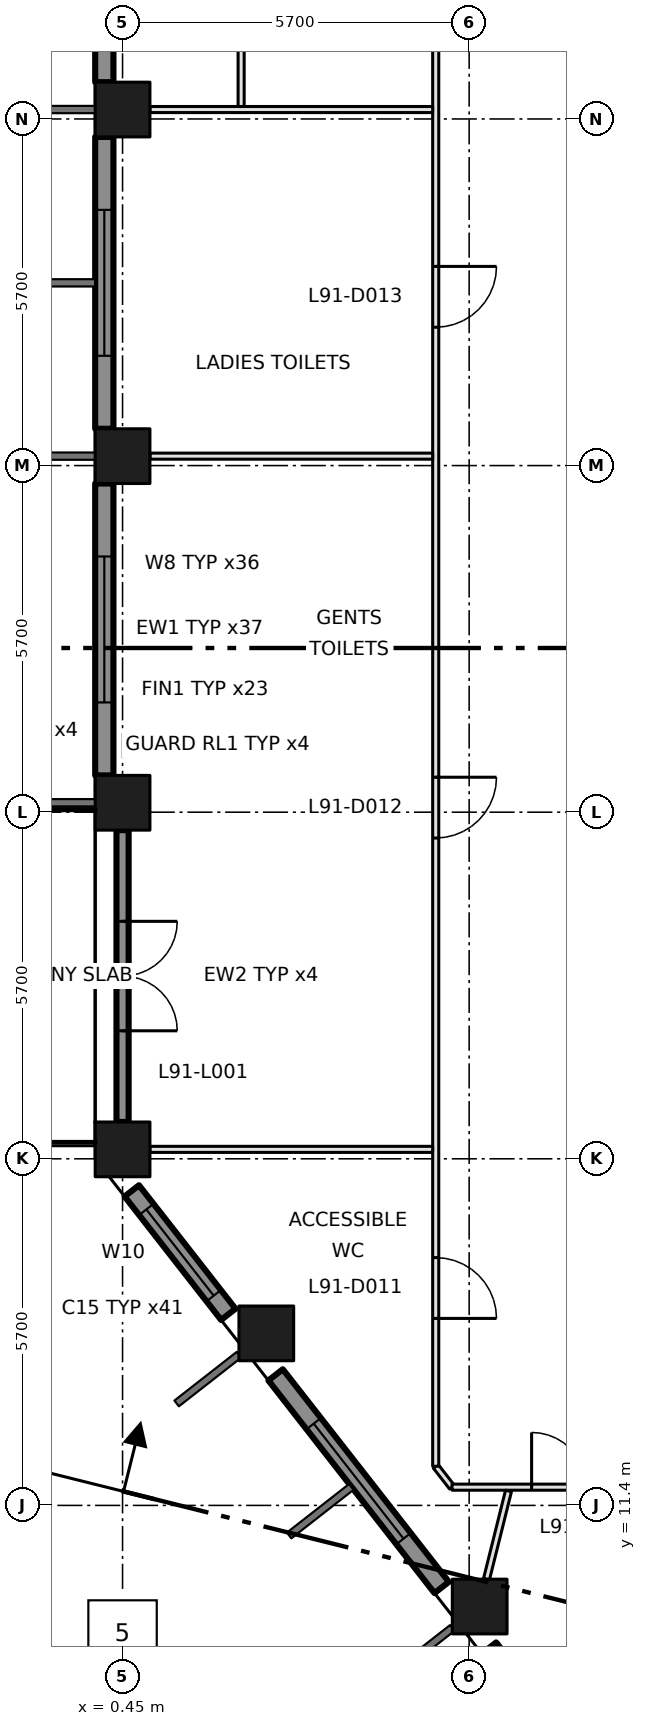
"""IFC4 building model, lengths in metres.
Left out: names, types, materials, properties, quantities, classifications, styles, units other than length and angle.
Written with IfcOpenShell. Run it as: python <this file> out.ifc"""

import sys

from ifc_helpers import new_model, si_unit, direction, frame, frame_2d, origin, origin_2d, place, context, subcontext, project, spatial, rectangle, extrude, element, fill, save


model = new_model("IFC4")
c1 = context("Model", 3, precision=1e-05, world=origin(), true_north=direction((0.0, 1.0)))
c2 = subcontext(c1, "Body", "Model", "MODEL_VIEW")
j1 = project(units=[si_unit("LENGTHUNIT", "METRE"), si_unit("PLANEANGLEUNIT", "RADIAN")], contexts=[c1])
p1 = place(None, origin())
s1 = spatial("IfcSite", under=j1, at=p1, CompositionType="ELEMENT")
p2 = place(p1, origin())
s2 = spatial("IfcBuilding", under=s1, at=p2, CompositionType="ELEMENT")
p3 = place(p2, frame((0.0, 0.0, 396.0)))
s3 = spatial("IfcBuildingStorey", under=s2, at=p3, CompositionType="ELEMENT", Elevation=396.0)
for number, where, z_axis, x_axis in (
    (1, (0.45, 17.255, 0.0), (0.0, 0.0, 1.0), (1.0, 0.0, 0.0)),
    (2, (0.45, 22.955, 0.0), (0.0, 0.0, 1.0), (1.0, 0.0, 0.0)),
    (3, (0.45, 28.655, 0.0), (0.0, 0.0, 1.0), (1.0, 0.0, 0.0)),
    (4, (0.45, 34.355, 0.0), (0.0, 0.0, 1.0), (1.0, 0.0, 0.0)),
    (5, (6.323, 9.737, 0.0), (0.0, 0.0, 1.0), (1.0, 0.0, 0.0)),
    (6, (2.814, 14.229, 0.0), (0.0, 0.0, 1.0), (1.0, 0.0, 0.0)),
):
    element("IfcColumn", number, at=place(p3, frame(where, z_axis=z_axis, x_axis=x_axis)), inside=s3, PredefinedType="COLUMN", context=c2, shape_type="SweptSolid", body=[
        extrude(rectangle(XDim=0.9, YDim=0.9, at=origin_2d()), origin(), (0.0, 0.0, 1.0), 4.2),
    ])
p4 = place(p3, frame((0.15, 39.605, 0.0), z_axis=(0.0, 0.0, 1.0), x_axis=(0.0, -1.0, 0.0)))
e7 = element("IfcWall", 7, at=p4, inside=s3, PredefinedType="SOLIDWALL", context=c2, shape_type="SweptSolid", body=[
    extrude(rectangle(XDim=4.8, YDim=0.3, at=frame_2d((2.4, 0.0))), origin(), (0.0, 0.0, 1.0), 3.05),
])
p5 = place(p4, frame((1.2, 0.0, 0.8)))
e8 = element("IfcOpeningElement", 8, at=p5, cuts=e7, PredefinedType="OPENING", context=c2, shape_type="SweptSolid", body=[
    extrude(rectangle(XDim=2.4, YDim=1.45, at=frame_2d((1.2, 0.725))), frame((0.0, 0.16, 0.0), z_axis=(0.0, -1.0, 0.0), x_axis=(1.0, 0.0, 0.0)), (0.0, 0.0, 1.0), 0.32),
])
p6 = place(p3, frame((0.15, 33.905, 0.0), z_axis=(0.0, 0.0, 1.0), x_axis=(0.0, -1.0, 0.0)))
e9 = element("IfcWall", 9, at=p6, inside=s3, PredefinedType="SOLIDWALL", context=c2, shape_type="SweptSolid", body=[
    extrude(rectangle(XDim=4.8, YDim=0.3, at=frame_2d((2.4, 0.0))), origin(), (0.0, 0.0, 1.0), 3.05),
])
p7 = place(p6, frame((1.2, 0.0, 0.8)))
e10 = element("IfcOpeningElement", 10, at=p7, cuts=e9, PredefinedType="OPENING", context=c2, shape_type="SweptSolid", body=[
    extrude(rectangle(XDim=2.4, YDim=1.45, at=frame_2d((1.2, 0.725))), frame((0.0, 0.16, 0.0), z_axis=(0.0, -1.0, 0.0), x_axis=(1.0, 0.0, 0.0)), (0.0, 0.0, 1.0), 0.32),
])
p8 = place(p3, frame((0.15, 28.205, 0.0), z_axis=(0.0, 0.0, 1.0), x_axis=(0.0, -1.0, 0.0)))
e11 = element("IfcWall", 11, at=p8, inside=s3, PredefinedType="SOLIDWALL", context=c2, shape_type="SweptSolid", body=[
    extrude(rectangle(XDim=4.8, YDim=0.3, at=frame_2d((2.4, 0.0))), origin(), (0.0, 0.0, 1.0), 3.05),
])
p9 = place(p8, frame((1.2, 0.0, 0.8)))
e12 = element("IfcOpeningElement", 12, at=p9, cuts=e11, PredefinedType="OPENING", context=c2, shape_type="SweptSolid", body=[
    extrude(rectangle(XDim=2.4, YDim=1.45, at=frame_2d((1.2, 0.725))), frame((0.0, 0.16, 0.0), z_axis=(0.0, -1.0, 0.0), x_axis=(1.0, 0.0, 0.0)), (0.0, 0.0, 1.0), 0.32),
])
p10 = place(p3, frame((0.45, 22.505, 0.0), z_axis=(0.0, 0.0, 1.0), x_axis=(0.0, -1.0, 0.0)))
e13 = element("IfcWall", 13, at=p10, inside=s3, PredefinedType="SOLIDWALL", context=c2, shape_type="SweptSolid", body=[
    extrude(rectangle(XDim=4.799, YDim=0.2, at=frame_2d((2.399, 0.0))), origin(), (0.0, 0.0, 1.0), 3.05),
])
p11 = place(p10, frame((1.5, 0.0, 0.0)))
e14 = element("IfcOpeningElement", 14, at=p11, cuts=e13, PredefinedType="OPENING", context=c2, shape_type="SweptSolid", body=[
    extrude(rectangle(XDim=1.8, YDim=2.9, at=frame_2d((0.9, 1.45))), frame((0.0, 0.11, 0.0), z_axis=(0.0, -1.0, 0.0), x_axis=(1.0, 0.0, 0.0)), (0.0, 0.0, 1.0), 0.22),
])
p12 = place(p3, frame((0.602, 16.573, 0.0), z_axis=(0.0, 0.0, 1.0), x_axis=(0.61568999437, -0.787988471256, 0.0)))
e15 = element("IfcWall", 15, at=p12, inside=s3, PredefinedType="SOLIDWALL", context=c2, shape_type="SweptSolid", body=[
    extrude(rectangle(XDim=2.577, YDim=0.3, at=frame_2d((1.289, 0.0))), origin(), (0.0, 0.0, 1.0), 3.05),
])
p13 = place(p12, frame((0.388, 0.0, 0.8)))
e16 = element("IfcOpeningElement", 16, at=p13, cuts=e15, PredefinedType="OPENING", context=c2, shape_type="SweptSolid", body=[
    extrude(rectangle(XDim=1.8, YDim=1.45, at=frame_2d((0.9, 0.725))), frame((0.0, 0.16, 0.0), z_axis=(0.0, -1.0, 0.0), x_axis=(1.0, 0.0, 0.0)), (0.0, 0.0, 1.0), 0.32),
])
p14 = place(p3, frame((2.967, 13.547, 0.0), z_axis=(0.0, 0.0, 1.0), x_axis=(0.615486001463, -0.788147817356, 0.0)))
e17 = element("IfcWall", 17, at=p14, inside=s3, PredefinedType="SOLIDWALL", context=c2, shape_type="SweptSolid", body=[
    extrude(rectangle(XDim=4.437, YDim=0.3, at=frame_2d((2.219, 0.0))), origin(), (0.0, 0.0, 1.0), 3.05),
])
p15 = place(p14, frame((1.018, 0.0, 0.8)))
e18 = element("IfcOpeningElement", 18, at=p15, cuts=e17, PredefinedType="OPENING", context=c2, shape_type="SweptSolid", body=[
    extrude(rectangle(XDim=2.4, YDim=1.45, at=frame_2d((1.2, 0.725))), frame((0.0, 0.16, 0.0), z_axis=(0.0, -1.0, 0.0), x_axis=(1.0, 0.0, 0.0)), (0.0, 0.0, 1.0), 0.32),
])
p16 = place(p3, frame((6.476, 9.055, 0.0), z_axis=(0.0, 0.0, 1.0), x_axis=(0.615649380255, -0.788020203162, 0.0)))
e19 = element("IfcWall", 19, at=p16, inside=s3, PredefinedType="SOLIDWALL", context=c2, shape_type="SweptSolid", body=[
    extrude(rectangle(XDim=4.438, YDim=0.3, at=frame_2d((2.219, 0.0))), origin(), (0.0, 0.0, 1.0), 3.05),
])
p17 = place(p16, frame((1.019, 0.0, 0.8)))
e20 = element("IfcOpeningElement", 20, at=p17, cuts=e19, PredefinedType="OPENING", context=c2, shape_type="SweptSolid", body=[
    extrude(rectangle(XDim=2.4, YDim=1.45, at=frame_2d((1.2, 0.725))), frame((0.0, 0.16, 0.0), z_axis=(0.0, -1.0, 0.0), x_axis=(1.0, 0.0, 0.0)), (0.0, 0.0, 1.0), 0.32),
])
p18 = place(p3, frame((5.6, 12.044, 0.0), z_axis=(0.0, 0.0, 1.0), x_axis=(0.614328236968, -0.789050579661, 0.0)))
e21 = element("IfcWall", 21, at=p18, inside=s3, PredefinedType="PARTITIONING", context=c2, shape_type="SweptSolid", body=[
    extrude(rectangle(XDim=0.436, YDim=0.1, at=frame_2d((0.218, 0.0))), origin(), (0.0, 0.0, 1.0), 3.75),
])
p19 = place(p3, frame((5.6, 39.77, 0.0), z_axis=(0.0, 0.0, 1.0), x_axis=(0.0, -1.0, 0.0)))
e22 = element("IfcWall", 22, at=p19, inside=s3, PredefinedType="PARTITIONING", context=c2, shape_type="SweptSolid", body=[
    extrude(rectangle(XDim=27.726, YDim=0.1, at=frame_2d((13.863, 0.0))), origin(), (0.0, 0.0, 1.0), 3.75),
])
p20 = place(p19, frame((24.295, 0.0, 0.0)))
e23 = element("IfcOpeningElement", 23, at=p20, cuts=e22, PredefinedType="OPENING", context=c2, shape_type="SweptSolid", body=[
    extrude(rectangle(XDim=1.0, YDim=2.1, at=frame_2d((0.5, 1.05))), frame((0.0, 0.06, 0.0), z_axis=(0.0, -1.0, 0.0), x_axis=(1.0, 0.0, 0.0)), (0.0, 0.0, 1.0), 0.12),
])
p21 = place(p19, frame((16.395, 0.0, 0.0)))
e24 = element("IfcOpeningElement", 24, at=p21, cuts=e22, PredefinedType="OPENING", context=c2, shape_type="SweptSolid", body=[
    extrude(rectangle(XDim=1.0, YDim=2.1, at=frame_2d((0.5, 1.05))), frame((0.0, 0.06, 0.0), z_axis=(0.0, -1.0, 0.0), x_axis=(1.0, 0.0, 0.0)), (0.0, 0.0, 1.0), 0.12),
])
p22 = place(p19, frame((7.995, 0.0, 0.0)))
e25 = element("IfcOpeningElement", 25, at=p22, cuts=e22, PredefinedType="OPENING", context=c2, shape_type="SweptSolid", body=[
    extrude(rectangle(XDim=1.0, YDim=2.1, at=frame_2d((0.5, 1.05))), frame((0.0, 0.06, 0.0), z_axis=(0.0, -1.0, 0.0), x_axis=(1.0, 0.0, 0.0)), (0.0, 0.0, 1.0), 0.12),
])
p23 = place(p19, frame((2.38, 0.0, 0.0)))
e26 = element("IfcOpeningElement", 26, at=p23, cuts=e22, PredefinedType="OPENING", context=c2, shape_type="SweptSolid", body=[
    extrude(rectangle(XDim=1.0, YDim=2.1, at=frame_2d((0.5, 1.05))), frame((0.0, 0.06, 0.0), z_axis=(0.0, -1.0, 0.0), x_axis=(1.0, 0.0, 0.0)), (0.0, 0.0, 1.0), 0.12),
])
p24 = place(p3, frame((5.868, 11.7, 0.0), z_axis=(0.0, 0.0, 1.0), x_axis=(1.0, 0.0, 0.0)))
e27 = element("IfcWall", 27, at=p24, inside=s3, PredefinedType="PARTITIONING", context=c2, shape_type="SweptSolid", body=[
    extrude(rectangle(XDim=3.433, YDim=0.1, at=frame_2d((1.717, 0.0))), origin(), (0.0, 0.0, 1.0), 3.75),
])
p25 = place(p24, frame((1.309, 0.0, 0.0)))
e28 = element("IfcOpeningElement", 28, at=p25, cuts=e27, PredefinedType="OPENING", context=c2, shape_type="SweptSolid", body=[
    extrude(rectangle(XDim=1.8, YDim=2.1, at=frame_2d((0.9, 1.05))), frame((0.0, 0.06, 0.0), z_axis=(0.0, -1.0, 0.0), x_axis=(1.0, 0.0, 0.0)), (0.0, 0.0, 1.0), 0.12),
])
p26 = place(p3, frame((0.9, 34.355, 0.0), z_axis=(0.0, 0.0, 1.0), x_axis=(1.0, 0.0, 0.0)))
e29 = element("IfcWall", 29, at=p26, inside=s3, PredefinedType="PARTITIONING", context=c2, shape_type="SweptSolid", body=[
    extrude(rectangle(XDim=4.65, YDim=0.1, at=frame_2d((2.325, 0.0))), origin(), (0.0, 0.0, 1.0), 3.75),
])
p27 = place(p3, frame((2.4, 34.405, 0.0), z_axis=(0.0, 0.0, 1.0), x_axis=(0.0, 1.0, 0.0)))
e30 = element("IfcWall", 30, at=p27, inside=s3, PredefinedType="PARTITIONING", context=c2, shape_type="SweptSolid", body=[
    extrude(rectangle(XDim=5.369, YDim=0.1, at=frame_2d((2.685, 0.0))), origin(), (0.0, 0.0, 1.0), 3.75),
])
for number, where, z_axis, x_axis in (
    (31, (5.55, 17.255, 0.0), (0.0, 0.0, 1.0), (-1.0, 0.0, 0.0)),
    (32, (5.55, 28.655, 0.0), (0.0, 0.0, 1.0), (-1.0, 0.0, 0.0)),
):
    element("IfcWall", number, at=place(p3, frame(where, z_axis=z_axis, x_axis=x_axis)), inside=s3, PredefinedType="PARTITIONING", context=c2, shape_type="SweptSolid", body=[
        extrude(rectangle(XDim=4.65, YDim=0.1, at=frame_2d((2.325, 0.0))), origin(), (0.0, 0.0, 1.0), 3.75),
    ])
p28 = place(p3, frame((6.797, 11.638, 0.0), z_axis=(0.0, 0.0, 1.0), x_axis=(-0.242113049408, -0.970248046278, 0.0)))
e33 = element("IfcWall", 33, at=p28, inside=s3, PredefinedType="PARTITIONING", context=c2, shape_type="SweptSolid", body=[
    extrude(rectangle(XDim=1.495, YDim=0.1, at=frame_2d((0.748, 0.0))), origin(), (0.0, 0.0, 1.0), 3.75),
])
p29 = place(p7, origin())
e34 = element("IfcWindow", 34, at=p29, inside=s3, PartitioningType="DOUBLE_PANEL_VERTICAL", PredefinedType="WINDOW", context=c2, shape_type="SweptSolid", body=[
    extrude(rectangle(XDim=2.4, YDim=1.45, at=frame_2d((1.2, 0.725))), frame((0.0, 0.03, 0.0), z_axis=(0.0, -1.0, 0.0), x_axis=(1.0, 0.0, 0.0)), (0.0, 0.0, 1.0), 0.06),
])
fill(e10, e34)
p30 = place(p9, origin())
e35 = element("IfcWindow", 35, at=p30, inside=s3, PartitioningType="DOUBLE_PANEL_VERTICAL", PredefinedType="WINDOW", context=c2, shape_type="SweptSolid", body=[
    extrude(rectangle(XDim=2.4, YDim=1.45, at=frame_2d((1.2, 0.725))), frame((0.0, 0.03, 0.0), z_axis=(0.0, -1.0, 0.0), x_axis=(1.0, 0.0, 0.0)), (0.0, 0.0, 1.0), 0.06),
])
fill(e12, e35)
p31 = place(p11, origin())
e36 = element("IfcDoor", 36, at=p31, inside=s3, OperationType="DOUBLE_DOOR_SINGLE_SWING", PredefinedType="DOOR", context=c2, shape_type="SweptSolid", body=[
    extrude(rectangle(XDim=1.8, YDim=2.9, at=frame_2d((0.9, 1.45))), frame((0.0, 0.025, 0.0), z_axis=(0.0, -1.0, 0.0), x_axis=(1.0, 0.0, 0.0)), (0.0, 0.0, 1.0), 0.05),
])
fill(e14, e36)
p32 = place(p13, origin())
e37 = element("IfcWindow", 37, at=p32, inside=s3, PartitioningType="DOUBLE_PANEL_VERTICAL", PredefinedType="WINDOW", context=c2, shape_type="SweptSolid", body=[
    extrude(rectangle(XDim=1.8, YDim=1.45, at=frame_2d((0.9, 0.725))), frame((0.0, 0.03, 0.0), z_axis=(0.0, -1.0, 0.0), x_axis=(1.0, 0.0, 0.0)), (0.0, 0.0, 1.0), 0.06),
])
fill(e16, e37)
p33 = place(p15, origin())
e38 = element("IfcWindow", 38, at=p33, inside=s3, PartitioningType="DOUBLE_PANEL_VERTICAL", PredefinedType="WINDOW", context=c2, shape_type="SweptSolid", body=[
    extrude(rectangle(XDim=2.4, YDim=1.45, at=frame_2d((1.2, 0.725))), frame((0.0, 0.03, 0.0), z_axis=(0.0, -1.0, 0.0), x_axis=(1.0, 0.0, 0.0)), (0.0, 0.0, 1.0), 0.06),
])
fill(e18, e38)
p34 = place(p25, origin())
e39 = element("IfcDoor", 39, at=p34, inside=s3, OperationType="DOUBLE_DOOR_SINGLE_SWING", PredefinedType="DOOR", context=c2, shape_type="SweptSolid", body=[
    extrude(rectangle(XDim=1.8, YDim=2.1, at=frame_2d((0.9, 1.05))), frame((0.0, 0.025, 0.0), z_axis=(0.0, -1.0, 0.0), x_axis=(1.0, 0.0, 0.0)), (0.0, 0.0, 1.0), 0.05),
])
fill(e28, e39)
p35 = place(p20, origin())
e40 = element("IfcDoor", 40, at=p35, inside=s3, OperationType="SINGLE_SWING_RIGHT", PredefinedType="DOOR", context=c2, shape_type="SweptSolid", body=[
    extrude(rectangle(XDim=1.0, YDim=2.1, at=frame_2d((0.5, 1.05))), frame((0.0, 0.025, 0.0), z_axis=(0.0, -1.0, 0.0), x_axis=(1.0, 0.0, 0.0)), (0.0, 0.0, 1.0), 0.05),
])
fill(e23, e40)
p36 = place(p21, origin())
e41 = element("IfcDoor", 41, at=p36, inside=s3, OperationType="SINGLE_SWING_LEFT", PredefinedType="DOOR", context=c2, shape_type="SweptSolid", body=[
    extrude(rectangle(XDim=1.0, YDim=2.1, at=frame_2d((0.5, 1.05))), frame((0.0, 0.025, 0.0), z_axis=(0.0, -1.0, 0.0), x_axis=(1.0, 0.0, 0.0)), (0.0, 0.0, 1.0), 0.05),
])
fill(e24, e41)
p37 = place(p22, origin())
e42 = element("IfcDoor", 42, at=p37, inside=s3, OperationType="SINGLE_SWING_LEFT", PredefinedType="DOOR", context=c2, shape_type="SweptSolid", body=[
    extrude(rectangle(XDim=1.0, YDim=2.1, at=frame_2d((0.5, 1.05))), frame((0.0, 0.025, 0.0), z_axis=(0.0, -1.0, 0.0), x_axis=(1.0, 0.0, 0.0)), (0.0, 0.0, 1.0), 0.05),
])
fill(e25, e42)
save(model, sys.argv[1])
